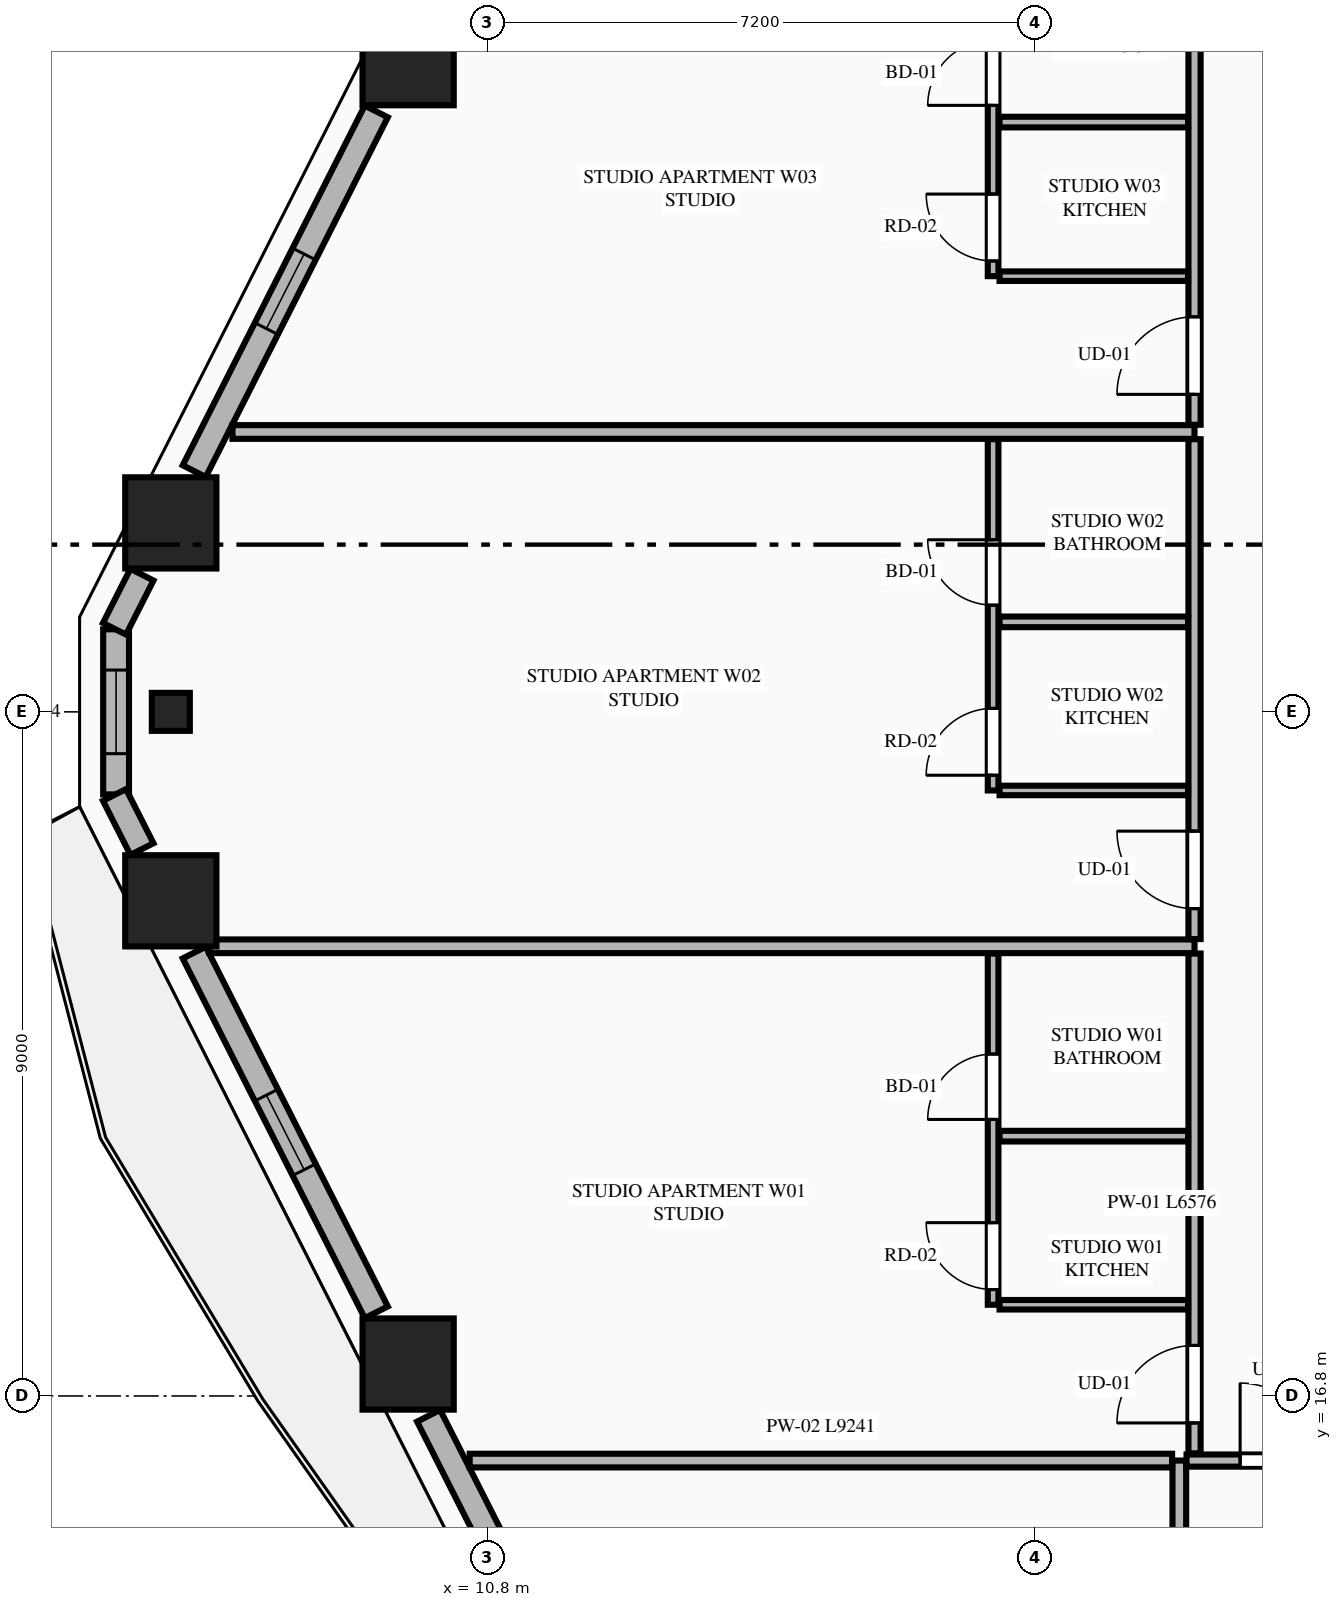
"""IFC4 building model, lengths in metres.
Left out: names, types, materials, properties, quantities, classifications, styles, units other than length and angle.
Written with IfcOpenShell. Run it as: python <this file> out.ifc"""

import sys

from ifc_helpers import new_model, si_unit, direction, frame, frame_2d, origin, origin_2d, place, context, subcontext, project, spatial, rectangle, extrude, element, fill, save


model = new_model("IFC4")
c1 = context("Model", 3, precision=1e-05, world=origin(), true_north=direction((0.0, 1.0)))
c2 = subcontext(c1, "Body", "Model", "MODEL_VIEW")
j1 = project(units=[si_unit("LENGTHUNIT", "METRE"), si_unit("PLANEANGLEUNIT", "RADIAN")], contexts=[c1])
p1 = place(None, origin())
s1 = spatial("IfcSite", under=j1, at=p1, CompositionType="ELEMENT")
p2 = place(p1, origin())
s2 = spatial("IfcBuilding", under=s1, at=p2, CompositionType="ELEMENT")
p3 = place(p2, frame((0.0, 0.0, 42.65)))
s3 = spatial("IfcBuildingStorey", under=s2, at=p3, CompositionType="ELEMENT", Elevation=42.65)
for number, where, z_axis, x_axis in (
    (1, (9.754, 34.38, 0.0), (0.0, 0.0, 1.0), (1.0, 0.0, 0.0)),
    (2, (6.632, 28.286, 0.0), (0.0, 0.0, 1.0), (1.0, 0.0, 0.0)),
    (3, (6.632, 23.314, 0.0), (0.0, 0.0, 1.0), (1.0, 0.0, 0.0)),
    (4, (9.754, 17.22, 0.0), (0.0, 0.0, 1.0), (1.0, 0.0, 0.0)),
):
    element("IfcColumn", number, at=place(p3, frame(where, z_axis=z_axis, x_axis=x_axis)), inside=s3, PredefinedType="COLUMN", context=c2, shape_type="SweptSolid", body=[
        extrude(rectangle(XDim=1.2, YDim=1.2, at=origin_2d()), origin(), (0.0, 0.0, 1.0), 3.55),
    ])
p4 = place(p3, frame((6.632, 25.8, 0.0), z_axis=(0.0, 0.0, 1.0), x_axis=(0.0, -1.0, 0.0)))
e5 = element("IfcColumn", 5, at=p4, inside=s3, PredefinedType="PILASTER", context=c2, shape_type="SweptSolid", body=[
    extrude(rectangle(XDim=0.5, YDim=0.35, at=origin_2d()), origin(), (0.0, 0.0, 1.0), 3.55),
])
p5 = place(p3, frame((5.912, 26.886, 0.0), z_axis=(0.0, 0.0, 1.0), x_axis=(0.0, -1.0, 0.0)))
e6 = element("IfcWall", 6, at=p5, inside=s3, PredefinedType="STANDARD", context=c2, shape_type="SweptSolid", body=[
    extrude(rectangle(XDim=2.172, YDim=0.34, at=frame_2d((1.086, 0.0))), origin(), (0.0, 0.0, 1.0), 3.33),
])
p6 = place(p5, frame((0.536, 0.0, 0.75)))
e7 = element("IfcOpeningElement", 7, at=p6, cuts=e6, PredefinedType="OPENING", context=c2, shape_type="SweptSolid", body=[
    extrude(rectangle(XDim=1.1, YDim=2.0, at=frame_2d((0.55, 1.0))), frame((0.0, 0.18, 0.0), z_axis=(0.0, -1.0, 0.0), x_axis=(1.0, 0.0, 0.0)), (0.0, 0.0, 1.0), 0.36),
])
p7 = place(p3, frame((9.335, 33.699, 0.0), z_axis=(0.0, 0.0, 1.0), x_axis=(-0.451590635984, -0.892225250422, 0.0)))
e8 = element("IfcWall", 8, at=p7, inside=s3, PredefinedType="STANDARD", context=c2, shape_type="SweptSolid", body=[
    extrude(rectangle(XDim=5.303, YDim=0.34, at=frame_2d((2.652, 0.0))), origin(), (0.0, 0.0, 1.0), 2.787),
])
p8 = place(p7, frame((2.102, 0.0, 0.75)))
e9 = element("IfcOpeningElement", 9, at=p8, cuts=e8, PredefinedType="OPENING", context=c2, shape_type="SweptSolid", body=[
    extrude(rectangle(XDim=1.1, YDim=1.887, at=frame_2d((0.55, 0.943))), frame((0.0, 0.18, 0.0), z_axis=(0.0, -1.0, 0.0), x_axis=(1.0, 0.0, 0.0)), (0.0, 0.0, 1.0), 0.36),
])
for number, where, z_axis, x_axis in (
    (10, (6.252, 27.605, 0.0), (0.0, 0.0, 1.0), (-0.452, -0.892, 0.0)),
    (11, (5.891, 24.707, 0.0), (0.0, 0.0, 1.0), (0.452, -0.892, 0.0)),
):
    element("IfcWall", number, at=place(p3, frame(where, z_axis=z_axis, x_axis=x_axis)), inside=s3, PredefinedType="STANDARD", context=c2, shape_type="SweptSolid", body=[
        extrude(rectangle(XDim=0.798, YDim=0.34, at=frame_2d((0.399, 0.0))), origin(), (0.0, 0.0, 1.0), 3.33),
    ])
p9 = place(p3, frame((6.94, 22.633, 0.0), z_axis=(0.0, 0.0, 1.0), x_axis=(0.451572088722, -0.892234637686, 0.0)))
e12 = element("IfcWall", 12, at=p9, inside=s3, PredefinedType="STANDARD", context=c2, shape_type="SweptSolid", body=[
    extrude(rectangle(XDim=5.304, YDim=0.34, at=frame_2d((2.652, 0.0))), origin(), (0.0, 0.0, 1.0), 2.787),
])
p10 = place(p9, frame((2.102, 0.0, 0.75)))
e13 = element("IfcOpeningElement", 13, at=p10, cuts=e12, PredefinedType="OPENING", context=c2, shape_type="SweptSolid", body=[
    extrude(rectangle(XDim=1.1, YDim=1.887, at=frame_2d((0.55, 0.943))), frame((0.0, 0.18, 0.0), z_axis=(0.0, -1.0, 0.0), x_axis=(1.0, 0.0, 0.0)), (0.0, 0.0, 1.0), 0.36),
])
p11 = place(p3, frame((10.024, 16.539, 0.0), z_axis=(0.0, 0.0, 1.0), x_axis=(0.451627137896, -0.892206774417, 0.0)))
e14 = element("IfcWall", 14, at=p11, inside=s3, PredefinedType="STANDARD", context=c2, shape_type="SweptSolid", body=[
    extrude(rectangle(XDim=5.547, YDim=0.34, at=frame_2d((2.773, 0.0))), origin(), (0.0, 0.0, 1.0), 2.787),
])
p12 = place(p11, frame((2.679, 0.0, 0.0)))
e15 = element("IfcOpeningElement", 15, at=p12, cuts=e14, PredefinedType="OPENING", context=c2, shape_type="SweptSolid", body=[
    extrude(rectangle(XDim=1.1, YDim=2.25, at=frame_2d((0.55, 1.125))), frame((0.0, 0.18, 0.0), z_axis=(0.0, -1.0, 0.0), x_axis=(1.0, 0.0, 0.0)), (0.0, 0.0, 1.0), 0.36),
])
p13 = place(p3, frame((19.9, 2.455, 0.0), z_axis=(0.0, 0.0, 1.0), x_axis=(0.0, 1.0, 0.0)))
e16 = element("IfcWall", 16, at=p13, inside=s3, PredefinedType="PARTITIONING", context=c2, shape_type="SweptSolid", body=[
    extrude(rectangle(XDim=13.495, YDim=0.18, at=frame_2d((6.748, 0.0))), origin(), (0.0, 0.0, 1.0), 3.33),
])
p14 = place(p3, frame((19.995, 15.95, 0.0), z_axis=(0.0, 0.0, 1.0), x_axis=(1.0, 0.0, 0.0)))
e17 = element("IfcWall", 17, at=p14, inside=s3, PredefinedType="PARTITIONING", context=c2, shape_type="SweptSolid", body=[
    extrude(rectangle(XDim=8.188, YDim=0.16, at=frame_2d((4.094, 0.0))), origin(), (0.0, 0.0, 1.0), 3.33),
])
p15 = place(p14, frame((0.705, 0.0, 0.0)))
e18 = element("IfcOpeningElement", 18, at=p15, cuts=e17, PredefinedType="OPENING", context=c2, shape_type="SweptSolid", body=[
    extrude(rectangle(XDim=1.02, YDim=2.25, at=frame_2d((0.51, 1.125))), frame((0.0, 0.09, 0.0), z_axis=(0.0, -1.0, 0.0), x_axis=(1.0, 0.0, 0.0)), (0.0, 0.0, 1.0), 0.18),
])
p16 = place(p3, frame((10.564, 15.95, 0.0), z_axis=(0.0, 0.0, 1.0), x_axis=(1.0, 0.0, 0.0)))
e19 = element("IfcWall", 19, at=p16, inside=s3, PredefinedType="PARTITIONING", context=c2, shape_type="SweptSolid", body=[
    extrude(rectangle(XDim=9.241, YDim=0.18, at=frame_2d((4.621, 0.0))), origin(), (0.0, 0.0, 1.0), 3.33),
])
p17 = place(p3, frame((20.1, 16.045, 0.0), z_axis=(0.0, 0.0, 1.0), x_axis=(0.0, 1.0, 0.0)))
e20 = element("IfcWall", 20, at=p17, inside=s3, PredefinedType="PARTITIONING", context=c2, shape_type="SweptSolid", body=[
    extrude(rectangle(XDim=6.576, YDim=0.16, at=frame_2d((3.288, 0.0))), origin(), (0.0, 0.0, 1.0), 2.7),
])
p18 = place(p17, frame((0.4, 0.0, 0.0)))
e21 = element("IfcOpeningElement", 21, at=p18, cuts=e20, PredefinedType="OPENING", context=c2, shape_type="SweptSolid", body=[
    extrude(rectangle(XDim=1.02, YDim=2.25, at=frame_2d((0.51, 1.125))), frame((0.0, 0.09, 0.0), z_axis=(0.0, -1.0, 0.0), x_axis=(1.0, 0.0, 0.0)), (0.0, 0.0, 1.0), 0.18),
])
p19 = place(p3, frame((17.535, 18.0, 0.0), z_axis=(0.0, 0.0, 1.0), x_axis=(1.0, 0.0, 0.0)))
e22 = element("IfcWall", 22, at=p19, inside=s3, PredefinedType="PARTITIONING", context=c2, shape_type="SweptSolid", body=[
    extrude(rectangle(XDim=2.48, YDim=0.125, at=frame_2d((1.24, 0.0))), origin(), (0.0, 0.0, 1.0), 2.7),
])
p20 = place(p3, frame((17.45, 18.0, 0.0), z_axis=(0.0, 0.0, 1.0), x_axis=(0.0, 1.0, 0.0)))
e23 = element("IfcWall", 23, at=p20, inside=s3, PredefinedType="PLUMBINGWALL", context=c2, shape_type="SweptSolid", body=[
    extrude(rectangle(XDim=4.621, YDim=0.14, at=frame_2d((2.311, 0.0))), origin(), (0.0, 0.0, 1.0), 3.33),
])
p21 = place(p20, frame((2.438, 0.0, 0.0)))
e24 = element("IfcOpeningElement", 24, at=p21, cuts=e23, PredefinedType="OPENING", context=c2, shape_type="SweptSolid", body=[
    extrude(rectangle(XDim=0.86, YDim=2.1, at=frame_2d((0.43, 1.05))), frame((0.0, 0.08, 0.0), z_axis=(0.0, -1.0, 0.0), x_axis=(1.0, 0.0, 0.0)), (0.0, 0.0, 1.0), 0.16),
])
p22 = place(p20, frame((0.2, 0.0, 0.0)))
e25 = element("IfcOpeningElement", 25, at=p22, cuts=e23, PredefinedType="OPENING", context=c2, shape_type="SweptSolid", body=[
    extrude(rectangle(XDim=0.88, YDim=2.15, at=frame_2d((0.44, 1.075))), frame((0.0, 0.08, 0.0), z_axis=(0.0, -1.0, 0.0), x_axis=(1.0, 0.0, 0.0)), (0.0, 0.0, 1.0), 0.16),
])
p23 = place(p3, frame((17.535, 20.218, 0.0), z_axis=(0.0, 0.0, 1.0), x_axis=(1.0, 0.0, 0.0)))
e26 = element("IfcWall", 26, at=p23, inside=s3, PredefinedType="PLUMBINGWALL", context=c2, shape_type="SweptSolid", body=[
    extrude(rectangle(XDim=2.48, YDim=0.14, at=frame_2d((1.24, 0.0))), origin(), (0.0, 0.0, 1.0), 3.33),
])
p24 = place(p3, frame((7.14, 22.716, 0.0), z_axis=(0.0, 0.0, 1.0), x_axis=(1.0, 0.0, 0.0)))
e27 = element("IfcWall", 27, at=p24, inside=s3, PredefinedType="PARTITIONING", context=c2, shape_type="SweptSolid", body=[
    extrude(rectangle(XDim=12.96, YDim=0.18, at=frame_2d((6.48, 0.0))), origin(), (0.0, 0.0, 1.0), 3.33),
])
p25 = place(p3, frame((20.1, 22.811, 0.0), z_axis=(0.0, 0.0, 1.0), x_axis=(0.0, 1.0, 0.0)))
e28 = element("IfcWall", 28, at=p25, inside=s3, PredefinedType="PARTITIONING", context=c2, shape_type="SweptSolid", body=[
    extrude(rectangle(XDim=6.576, YDim=0.16, at=frame_2d((3.288, 0.0))), origin(), (0.0, 0.0, 1.0), 3.33),
])
p26 = place(p25, frame((0.4, 0.0, 0.0)))
e29 = element("IfcOpeningElement", 29, at=p26, cuts=e28, PredefinedType="OPENING", context=c2, shape_type="SweptSolid", body=[
    extrude(rectangle(XDim=1.02, YDim=2.25, at=frame_2d((0.51, 1.125))), frame((0.0, 0.09, 0.0), z_axis=(0.0, -1.0, 0.0), x_axis=(1.0, 0.0, 0.0)), (0.0, 0.0, 1.0), 0.18),
])
p27 = place(p3, frame((17.535, 24.766, 0.0), z_axis=(0.0, 0.0, 1.0), x_axis=(1.0, 0.0, 0.0)))
e30 = element("IfcWall", 30, at=p27, inside=s3, PredefinedType="PARTITIONING", context=c2, shape_type="SweptSolid", body=[
    extrude(rectangle(XDim=2.48, YDim=0.125, at=frame_2d((1.24, 0.0))), origin(), (0.0, 0.0, 1.0), 3.33),
])
p28 = place(p3, frame((17.45, 24.766, 0.0), z_axis=(0.0, 0.0, 1.0), x_axis=(0.0, 1.0, 0.0)))
e31 = element("IfcWall", 31, at=p28, inside=s3, PredefinedType="PLUMBINGWALL", context=c2, shape_type="SweptSolid", body=[
    extrude(rectangle(XDim=4.621, YDim=0.14, at=frame_2d((2.311, 0.0))), origin(), (0.0, 0.0, 1.0), 3.33),
])
p29 = place(p28, frame((2.438, 0.0, 0.0)))
e32 = element("IfcOpeningElement", 32, at=p29, cuts=e31, PredefinedType="OPENING", context=c2, shape_type="SweptSolid", body=[
    extrude(rectangle(XDim=0.86, YDim=2.1, at=frame_2d((0.43, 1.05))), frame((0.0, 0.08, 0.0), z_axis=(0.0, -1.0, 0.0), x_axis=(1.0, 0.0, 0.0)), (0.0, 0.0, 1.0), 0.16),
])
p30 = place(p28, frame((0.2, 0.0, 0.0)))
e33 = element("IfcOpeningElement", 33, at=p30, cuts=e31, PredefinedType="OPENING", context=c2, shape_type="SweptSolid", body=[
    extrude(rectangle(XDim=0.88, YDim=2.15, at=frame_2d((0.44, 1.075))), frame((0.0, 0.08, 0.0), z_axis=(0.0, -1.0, 0.0), x_axis=(1.0, 0.0, 0.0)), (0.0, 0.0, 1.0), 0.16),
])
p31 = place(p3, frame((17.535, 26.984, 0.0), z_axis=(0.0, 0.0, 1.0), x_axis=(1.0, 0.0, 0.0)))
e34 = element("IfcWall", 34, at=p31, inside=s3, PredefinedType="PLUMBINGWALL", context=c2, shape_type="SweptSolid", body=[
    extrude(rectangle(XDim=2.48, YDim=0.14, at=frame_2d((1.24, 0.0))), origin(), (0.0, 0.0, 1.0), 3.33),
])
p32 = place(p3, frame((7.443, 29.482, 0.0), z_axis=(0.0, 0.0, 1.0), x_axis=(1.0, 0.0, 0.0)))
e35 = element("IfcWall", 35, at=p32, inside=s3, PredefinedType="PARTITIONING", context=c2, shape_type="SweptSolid", body=[
    extrude(rectangle(XDim=12.657, YDim=0.18, at=frame_2d((6.329, 0.0))), origin(), (0.0, 0.0, 1.0), 3.33),
])
p33 = place(p3, frame((20.1, 29.577, 0.0), z_axis=(0.0, 0.0, 1.0), x_axis=(0.0, 1.0, 0.0)))
e36 = element("IfcWall", 36, at=p33, inside=s3, PredefinedType="PARTITIONING", context=c2, shape_type="SweptSolid", body=[
    extrude(rectangle(XDim=6.178, YDim=0.16, at=frame_2d((3.089, 0.0))), origin(), (0.0, 0.0, 1.0), 2.7),
])
p34 = place(p33, frame((0.4, 0.0, 0.0)))
e37 = element("IfcOpeningElement", 37, at=p34, cuts=e36, PredefinedType="OPENING", context=c2, shape_type="SweptSolid", body=[
    extrude(rectangle(XDim=1.02, YDim=2.25, at=frame_2d((0.51, 1.125))), frame((0.0, 0.09, 0.0), z_axis=(0.0, -1.0, 0.0), x_axis=(1.0, 0.0, 0.0)), (0.0, 0.0, 1.0), 0.18),
])
p35 = place(p3, frame((17.535, 31.532, 0.0), z_axis=(0.0, 0.0, 1.0), x_axis=(1.0, 0.0, 0.0)))
e38 = element("IfcWall", 38, at=p35, inside=s3, PredefinedType="PARTITIONING", context=c2, shape_type="SweptSolid", body=[
    extrude(rectangle(XDim=2.48, YDim=0.125, at=frame_2d((1.24, 0.0))), origin(), (0.0, 0.0, 1.0), 3.33),
])
p36 = place(p3, frame((17.45, 31.532, 0.0), z_axis=(0.0, 0.0, 1.0), x_axis=(0.0, 1.0, 0.0)))
e39 = element("IfcWall", 39, at=p36, inside=s3, PredefinedType="PLUMBINGWALL", context=c2, shape_type="SweptSolid", body=[
    extrude(rectangle(XDim=4.223, YDim=0.14, at=frame_2d((2.111, 0.0))), origin(), (0.0, 0.0, 1.0), 3.33),
])
p37 = place(p36, frame((2.247, 0.0, 0.0)))
e40 = element("IfcOpeningElement", 40, at=p37, cuts=e39, PredefinedType="OPENING", context=c2, shape_type="SweptSolid", body=[
    extrude(rectangle(XDim=0.86, YDim=2.1, at=frame_2d((0.43, 1.05))), frame((0.0, 0.08, 0.0), z_axis=(0.0, -1.0, 0.0), x_axis=(1.0, 0.0, 0.0)), (0.0, 0.0, 1.0), 0.16),
])
p38 = place(p36, frame((0.2, 0.0, 0.0)))
e41 = element("IfcOpeningElement", 41, at=p38, cuts=e39, PredefinedType="OPENING", context=c2, shape_type="SweptSolid", body=[
    extrude(rectangle(XDim=0.88, YDim=2.15, at=frame_2d((0.44, 1.075))), frame((0.0, 0.08, 0.0), z_axis=(0.0, -1.0, 0.0), x_axis=(1.0, 0.0, 0.0)), (0.0, 0.0, 1.0), 0.16),
])
p39 = place(p3, frame((17.535, 33.559, 0.0), z_axis=(0.0, 0.0, 1.0), x_axis=(1.0, 0.0, 0.0)))
e42 = element("IfcWall", 42, at=p39, inside=s3, PredefinedType="PLUMBINGWALL", context=c2, shape_type="SweptSolid", body=[
    extrude(rectangle(XDim=2.48, YDim=0.14, at=frame_2d((1.24, 0.0))), origin(), (0.0, 0.0, 1.0), 2.7),
])
p40 = place(p8, origin())
e43 = element("IfcWindow", 43, at=p40, inside=s3, PartitioningType="SINGLE_PANEL", PredefinedType="WINDOW", context=c2, shape_type="SweptSolid", body=[
    extrude(rectangle(XDim=1.1, YDim=1.887, at=frame_2d((0.55, 0.943))), frame((0.0, 0.03, 0.0), z_axis=(0.0, -1.0, 0.0), x_axis=(1.0, 0.0, 0.0)), (0.0, 0.0, 1.0), 0.06),
])
fill(e9, e43)
p41 = place(p10, origin())
e44 = element("IfcWindow", 44, at=p41, inside=s3, PartitioningType="SINGLE_PANEL", PredefinedType="WINDOW", context=c2, shape_type="SweptSolid", body=[
    extrude(rectangle(XDim=1.1, YDim=1.887, at=frame_2d((0.55, 0.943))), frame((0.0, 0.03, 0.0), z_axis=(0.0, -1.0, 0.0), x_axis=(1.0, 0.0, 0.0)), (0.0, 0.0, 1.0), 0.06),
])
fill(e13, e44)
p42 = place(p15, origin())
e45 = element("IfcDoor", 45, at=p42, inside=s3, OperationType="SINGLE_SWING_LEFT", PredefinedType="DOOR", context=c2, shape_type="SweptSolid", body=[
    extrude(rectangle(XDim=1.02, YDim=2.25, at=frame_2d((0.51, 1.125))), frame((0.0, 0.025, 0.0), z_axis=(0.0, -1.0, 0.0), x_axis=(1.0, 0.0, 0.0)), (0.0, 0.0, 1.0), 0.05),
])
fill(e18, e45)
p43 = place(p21, origin())
e46 = element("IfcDoor", 46, at=p43, inside=s3, OperationType="SINGLE_SWING_LEFT", PredefinedType="DOOR", context=c2, shape_type="SweptSolid", body=[
    extrude(rectangle(XDim=0.86, YDim=2.1, at=frame_2d((0.43, 1.05))), frame((0.0, 0.025, 0.0), z_axis=(0.0, -1.0, 0.0), x_axis=(1.0, 0.0, 0.0)), (0.0, 0.0, 1.0), 0.05),
])
fill(e24, e46)
p44 = place(p18, origin())
e47 = element("IfcDoor", 47, at=p44, inside=s3, OperationType="SINGLE_SWING_LEFT", PredefinedType="DOOR", context=c2, shape_type="SweptSolid", body=[
    extrude(rectangle(XDim=1.02, YDim=2.25, at=frame_2d((0.51, 1.125))), frame((0.0, 0.025, 0.0), z_axis=(0.0, -1.0, 0.0), x_axis=(1.0, 0.0, 0.0)), (0.0, 0.0, 1.0), 0.05),
])
fill(e21, e47)
p45 = place(p22, origin())
e48 = element("IfcDoor", 48, at=p45, inside=s3, OperationType="SINGLE_SWING_RIGHT", PredefinedType="DOOR", context=c2, shape_type="SweptSolid", body=[
    extrude(rectangle(XDim=0.88, YDim=2.15, at=frame_2d((0.44, 1.075))), frame((0.0, 0.025, 0.0), z_axis=(0.0, -1.0, 0.0), x_axis=(1.0, 0.0, 0.0)), (0.0, 0.0, 1.0), 0.05),
])
fill(e25, e48)
p46 = place(p29, origin())
e49 = element("IfcDoor", 49, at=p46, inside=s3, OperationType="SINGLE_SWING_RIGHT", PredefinedType="DOOR", context=c2, shape_type="SweptSolid", body=[
    extrude(rectangle(XDim=0.86, YDim=2.1, at=frame_2d((0.43, 1.05))), frame((0.0, 0.025, 0.0), z_axis=(0.0, -1.0, 0.0), x_axis=(1.0, 0.0, 0.0)), (0.0, 0.0, 1.0), 0.05),
])
fill(e32, e49)
p47 = place(p26, origin())
e50 = element("IfcDoor", 50, at=p47, inside=s3, OperationType="SINGLE_SWING_RIGHT", PredefinedType="DOOR", context=c2, shape_type="SweptSolid", body=[
    extrude(rectangle(XDim=1.02, YDim=2.25, at=frame_2d((0.51, 1.125))), frame((0.0, 0.025, 0.0), z_axis=(0.0, -1.0, 0.0), x_axis=(1.0, 0.0, 0.0)), (0.0, 0.0, 1.0), 0.05),
])
fill(e29, e50)
p48 = place(p30, origin())
e51 = element("IfcDoor", 51, at=p48, inside=s3, OperationType="SINGLE_SWING_LEFT", PredefinedType="DOOR", context=c2, shape_type="SweptSolid", body=[
    extrude(rectangle(XDim=0.88, YDim=2.15, at=frame_2d((0.44, 1.075))), frame((0.0, 0.025, 0.0), z_axis=(0.0, -1.0, 0.0), x_axis=(1.0, 0.0, 0.0)), (0.0, 0.0, 1.0), 0.05),
])
fill(e33, e51)
p49 = place(p37, origin())
e52 = element("IfcDoor", 52, at=p49, inside=s3, OperationType="SINGLE_SWING_LEFT", PredefinedType="DOOR", context=c2, shape_type="SweptSolid", body=[
    extrude(rectangle(XDim=0.86, YDim=2.1, at=frame_2d((0.43, 1.05))), frame((0.0, 0.025, 0.0), z_axis=(0.0, -1.0, 0.0), x_axis=(1.0, 0.0, 0.0)), (0.0, 0.0, 1.0), 0.05),
])
fill(e40, e52)
p50 = place(p34, origin())
e53 = element("IfcDoor", 53, at=p50, inside=s3, OperationType="SINGLE_SWING_LEFT", PredefinedType="DOOR", context=c2, shape_type="SweptSolid", body=[
    extrude(rectangle(XDim=1.02, YDim=2.25, at=frame_2d((0.51, 1.125))), frame((0.0, 0.025, 0.0), z_axis=(0.0, -1.0, 0.0), x_axis=(1.0, 0.0, 0.0)), (0.0, 0.0, 1.0), 0.05),
])
fill(e37, e53)
p51 = place(p38, origin())
e54 = element("IfcDoor", 54, at=p51, inside=s3, OperationType="SINGLE_SWING_RIGHT", PredefinedType="DOOR", context=c2, shape_type="SweptSolid", body=[
    extrude(rectangle(XDim=0.88, YDim=2.15, at=frame_2d((0.44, 1.075))), frame((0.0, 0.025, 0.0), z_axis=(0.0, -1.0, 0.0), x_axis=(1.0, 0.0, 0.0)), (0.0, 0.0, 1.0), 0.05),
])
fill(e41, e54)
p52 = place(p6, origin())
e55 = element("IfcWindow", 55, at=p52, inside=s3, PartitioningType="SINGLE_PANEL", PredefinedType="WINDOW", context=c2, shape_type="SweptSolid", body=[
    extrude(rectangle(XDim=1.1, YDim=2.0, at=frame_2d((0.55, 1.0))), frame((0.0, 0.03, 0.0), z_axis=(0.0, -1.0, 0.0), x_axis=(1.0, 0.0, 0.0)), (0.0, 0.0, 1.0), 0.06),
])
fill(e7, e55)
save(model, sys.argv[1])
